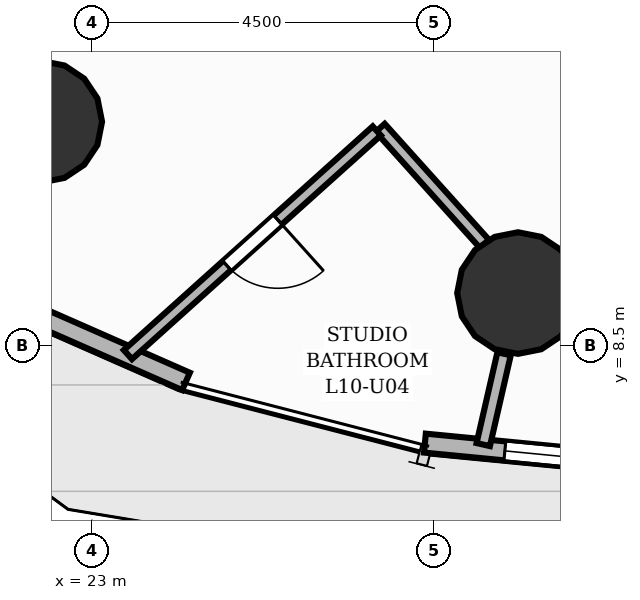
"""IFC4 building model, lengths in metres.
Left out: names, types, materials, properties, quantities, classifications, styles, units other than length and angle.
Written with IfcOpenShell. Run it as: python <this file> out.ifc"""

import sys

from ifc_helpers import new_model, si_unit, direction, frame, frame_2d, origin, origin_2d, place, context, subcontext, project, spatial, rectangle, circle, extrude, element, fill, save


model = new_model("IFC4")
c1 = context("Model", 3, precision=1e-05, world=origin(), true_north=direction((0.0, 1.0)))
c2 = subcontext(c1, "Body", "Model", "MODEL_VIEW")
j1 = project(units=[si_unit("LENGTHUNIT", "METRE"), si_unit("PLANEANGLEUNIT", "RADIAN")], contexts=[c1])
p1 = place(None, origin())
s1 = spatial("IfcSite", under=j1, at=p1, CompositionType="ELEMENT")
p2 = place(p1, origin())
s2 = spatial("IfcBuilding", under=s1, at=p2, CompositionType="ELEMENT")
p3 = place(p2, frame((0.0, 0.0, 37.6)))
s3 = spatial("IfcBuildingStorey", under=s2, at=p3, CompositionType="ELEMENT", Elevation=37.6)
for number, where, z_axis, x_axis in (
    (1, (22.333, 11.445, 0.0), (0.0, 0.0, 1.0), (1.0, 0.0, 0.0)),
    (2, (28.605, 9.19, 0.0), (0.0, 0.0, 1.0), (1.0, 0.0, 0.0)),
):
    element("IfcColumn", number, at=place(p3, frame(where, z_axis=z_axis, x_axis=x_axis)), inside=s3, PredefinedType="COLUMN", context=c2, shape_type="SweptSolid", body=[
        extrude(circle(Radius=0.8, at=origin_2d()), origin(), (0.0, 0.0, 1.0), 3.2),
    ])
p4 = place(p3, frame((24.237, 8.028, 0.0), z_axis=(0.0, 0.0, 1.0), x_axis=(-0.915312914138, 0.402743428515, 0.0)))
e3 = element("IfcWall", 3, at=p4, inside=s3, PredefinedType="SOLIDWALL", context=c2, shape_type="SweptSolid", body=[
    extrude(rectangle(XDim=3.399, YDim=0.25, at=frame_2d((1.699, 0.0))), origin(), (0.0, 0.0, 1.0), 2.96),
])
p5 = place(p3, frame((30.877, 6.876, 0.0), z_axis=(0.0, 0.0, 1.0), x_axis=(-0.995323323337, 0.096599596386, 0.0)))
e4 = element("IfcWall", 4, at=p5, inside=s3, PredefinedType="SOLIDWALL", context=c2, shape_type="SweptSolid", body=[
    extrude(rectangle(XDim=3.513, YDim=0.25, at=frame_2d((1.756, 0.0))), origin(), (0.0, 0.0, 1.0), 2.96),
])
p6 = place(p5, frame((1.056, 0.0, 0.85)))
e5 = element("IfcOpeningElement", 5, at=p6, cuts=e4, PredefinedType="OPENING", context=c2, shape_type="SweptSolid", body=[
    extrude(rectangle(XDim=1.4, YDim=1.29, at=frame_2d((0.7, 0.645))), frame((0.0, 0.135, 0.0), z_axis=(0.0, -1.0, 0.0), x_axis=(1.0, 0.0, 0.0)), (0.0, 0.0, 1.0), 0.27),
])
p7 = place(p3, frame((28.422, 8.391, 0.0), z_axis=(0.0, 0.0, 1.0), x_axis=(-0.223317008343, -0.974745871386, 0.0)))
e6 = element("IfcWall", 6, at=p7, inside=s3, PredefinedType="PARTITIONING", context=c2, shape_type="SweptSolid", body=[
    extrude(rectangle(XDim=1.226, YDim=0.18, at=frame_2d((0.613, 0.0))), origin(), (0.0, 0.0, 1.0), 2.178),
])
p8 = place(p3, frame((28.164, 9.837, 0.0), z_axis=(0.0, 0.0, 1.0), x_axis=(-0.668451915184, 0.743755361048, 0.0)))
e7 = element("IfcWall", 7, at=p8, inside=s3, PredefinedType="PLUMBINGWALL", context=c2, shape_type="SweptSolid", body=[
    extrude(rectangle(XDim=2.052, YDim=0.16, at=frame_2d((1.026, 0.0))), origin(), (0.0, 0.0, 1.0), 2.955),
])
p9 = place(p3, frame((26.748, 11.324, 0.0), z_axis=(0.0, 0.0, 1.0), x_axis=(-0.743726854299, -0.668483631957, 0.0)))
e8 = element("IfcWall", 8, at=p9, inside=s3, PredefinedType="PLUMBINGWALL", context=c2, shape_type="SweptSolid", body=[
    extrude(rectangle(XDim=4.403, YDim=0.16, at=frame_2d((2.202, 0.0))), origin(), (0.0, 0.0, 1.0), 2.955),
])
p10 = place(p9, frame((1.751, 0.0, 0.0)))
e9 = element("IfcOpeningElement", 9, at=p10, cuts=e8, PredefinedType="OPENING", context=c2, shape_type="SweptSolid", body=[
    extrude(rectangle(XDim=0.9, YDim=2.1, at=frame_2d((0.45, 1.05))), frame((0.0, 0.09, 0.0), z_axis=(0.0, -1.0, 0.0), x_axis=(1.0, 0.0, 0.0)), (0.0, 0.0, 1.0), 0.18),
])
p11 = place(p6, origin())
e10 = element("IfcWindow", 10, at=p11, inside=s3, PartitioningType="SINGLE_PANEL", PredefinedType="WINDOW", context=c2, shape_type="SweptSolid", body=[
    extrude(rectangle(XDim=1.4, YDim=1.29, at=frame_2d((0.7, 0.645))), frame((0.0, 0.03, 0.0), z_axis=(0.0, -1.0, 0.0), x_axis=(1.0, 0.0, 0.0)), (0.0, 0.0, 1.0), 0.06),
])
fill(e5, e10)
p12 = place(p10, origin())
e11 = element("IfcDoor", 11, at=p12, inside=s3, OperationType="SINGLE_SWING_LEFT", PredefinedType="DOOR", context=c2, shape_type="SweptSolid", body=[
    extrude(rectangle(XDim=0.9, YDim=2.1, at=frame_2d((0.45, 1.05))), frame((0.0, 0.025, 0.0), z_axis=(0.0, -1.0, 0.0), x_axis=(1.0, 0.0, 0.0)), (0.0, 0.0, 1.0), 0.05),
])
fill(e9, e11)
save(model, sys.argv[1])
